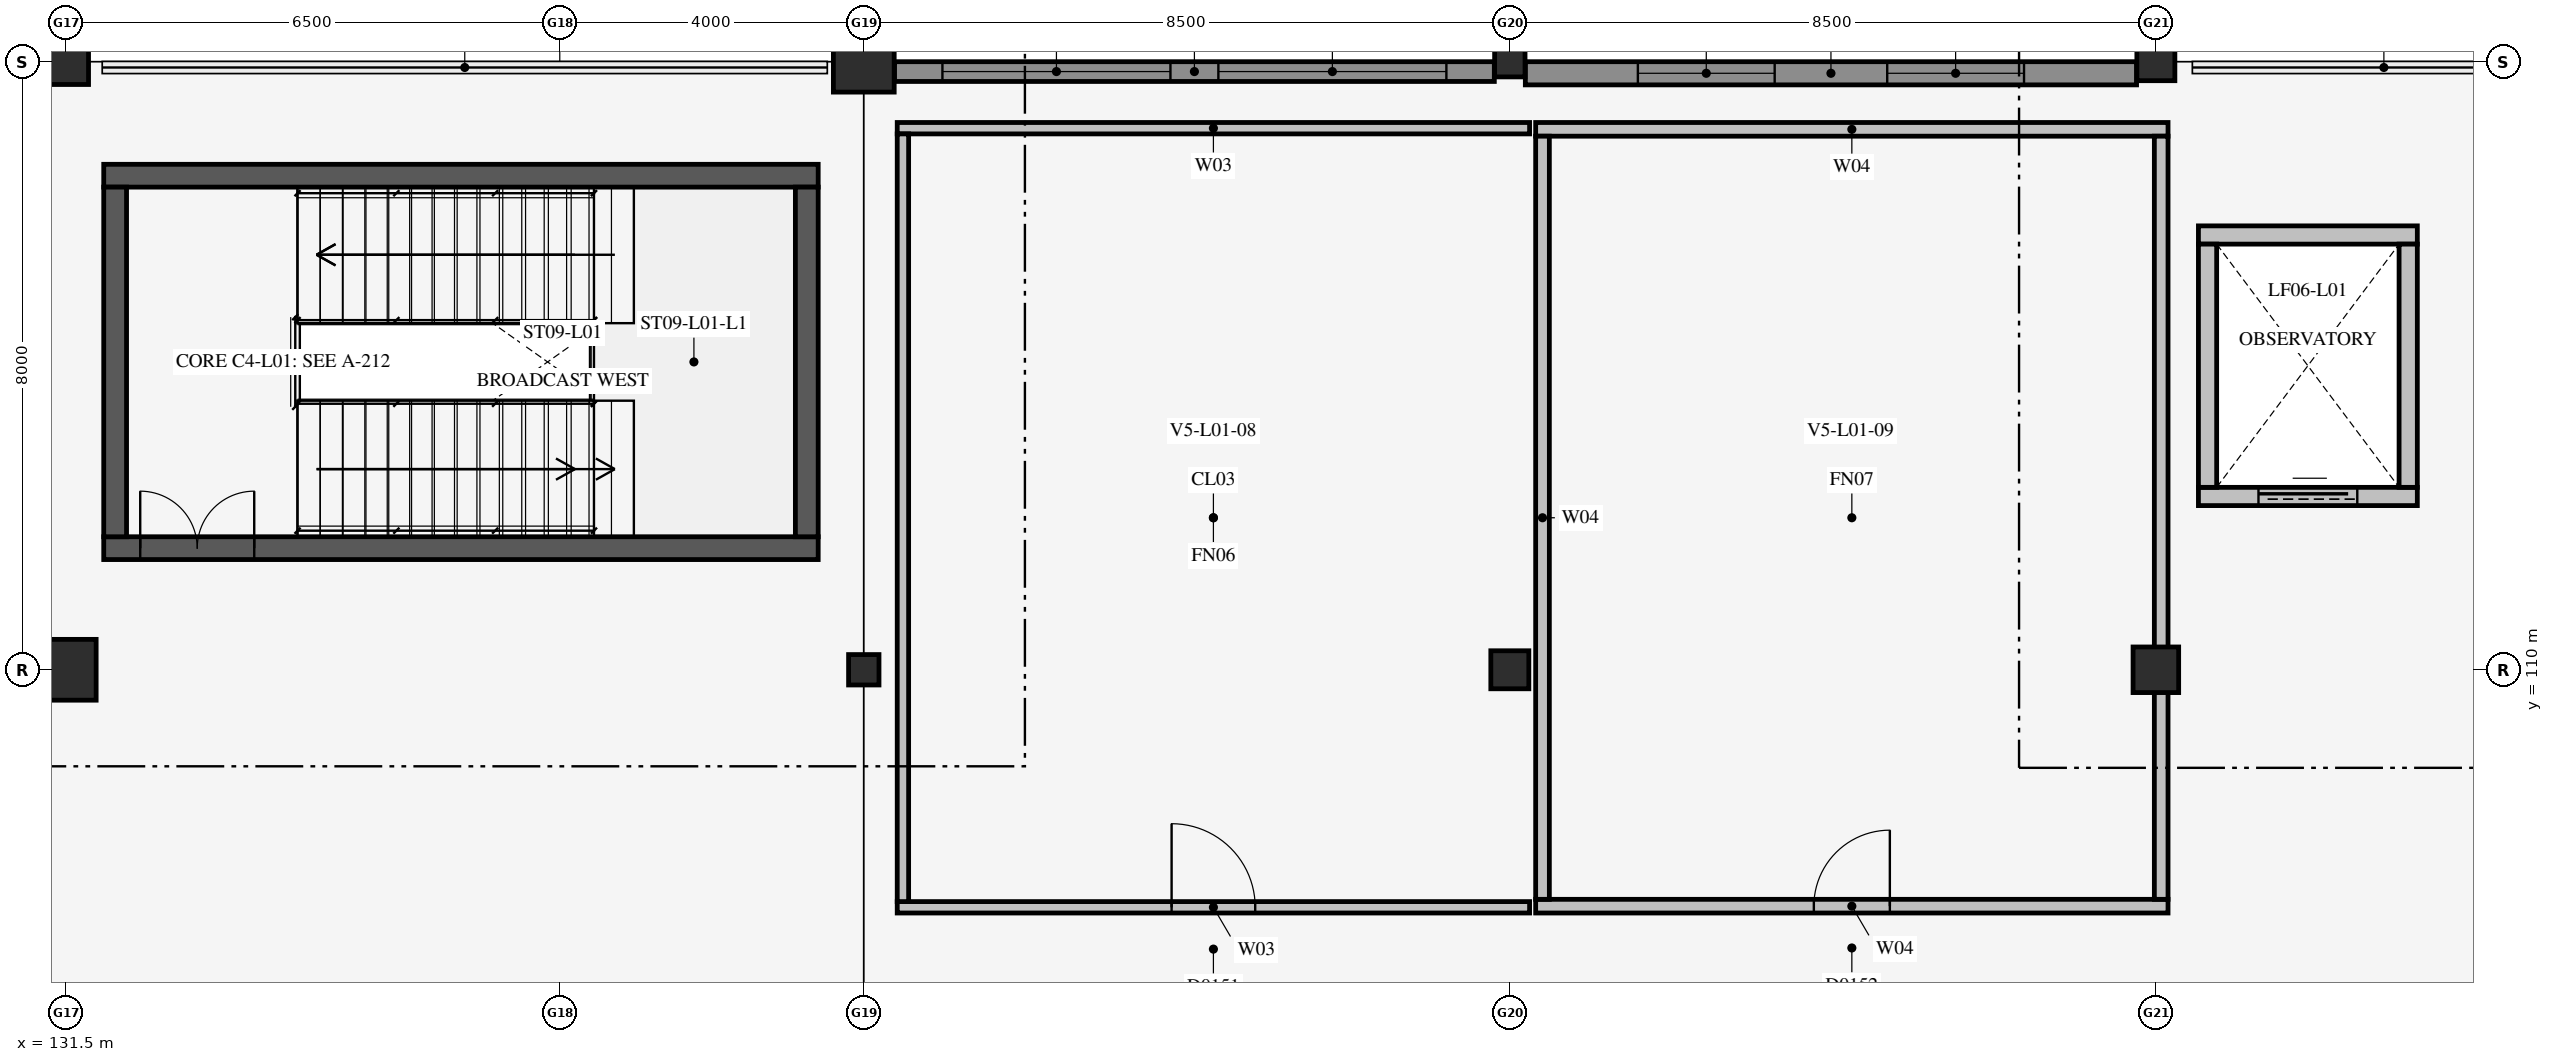
"""IFC4 building model, lengths in metres.
Left out: names, types, materials, properties, quantities, classifications, styles, units other than length and angle.
Written with IfcOpenShell. Run it as: python <this file> out.ifc"""

import sys

from ifc_helpers import new_model, si_unit, direction, frame, frame_2d, origin, origin_2d, place, context, subcontext, project, spatial, rectangle, circle, extrude, element, fill, save


model = new_model("IFC4")
c1 = context("Model", 3, precision=1e-05, world=origin(), true_north=direction((0.0, 1.0)))
c2 = subcontext(c1, "Body", "Model", "MODEL_VIEW")
j1 = project(units=[si_unit("LENGTHUNIT", "METRE"), si_unit("PLANEANGLEUNIT", "RADIAN")], contexts=[c1])
p1 = place(None, origin())
s1 = spatial("IfcSite", under=j1, at=p1, CompositionType="ELEMENT")
p2 = place(p1, origin())
s2 = spatial("IfcBuilding", under=s1, at=p2, CompositionType="ELEMENT")
p3 = place(p2, frame((0.0, 0.0, 5.4)))
s3 = spatial("IfcBuildingStorey", under=s2, at=p3, CompositionType="ELEMENT", Elevation=5.4)
p4 = place(p3, frame((132.0, 111.6, 0.0), z_axis=(0.0, 0.0, 1.0), x_axis=(1.0, 0.0, 0.0)))
e1 = element("IfcWall", 1, at=p4, inside=s3, PredefinedType="SHEAR", context=c2, shape_type="SweptSolid", body=[
    extrude(rectangle(XDim=9.4, YDim=0.3, at=frame_2d((4.7, 0.0))), origin(), (0.0, 0.0, 1.0), 4.56),
])
p5 = place(p4, frame((0.48, 0.0, 0.0)))
e2 = element("IfcOpeningElement", 2, at=p5, cuts=e1, PredefinedType="OPENING", context=c2, shape_type="SweptSolid", body=[
    extrude(rectangle(XDim=1.5, YDim=2.3, at=frame_2d((0.75, 1.15))), frame((0.0, 0.162, 0.0), z_axis=(0.0, -1.0, 0.0), x_axis=(1.0, 0.0, 0.0)), (0.0, 0.0, 1.0), 0.324),
])
p6 = place(p3, frame((132.0, 116.5, 0.0), z_axis=(0.0, 0.0, 1.0), x_axis=(1.0, 0.0, 0.0)))
e3 = element("IfcWall", 3, at=p6, inside=s3, PredefinedType="SHEAR", context=c2, shape_type="SweptSolid", body=[
    extrude(rectangle(XDim=9.4, YDim=0.3, at=frame_2d((4.7, 0.0))), origin(), (0.0, 0.0, 1.0), 4.56),
])
for number, where, z_axis, x_axis in (
    (4, (132.15, 111.75, 0.0), (0.0, 0.0, 1.0), (0.0, 1.0, 0.0)),
    (5, (141.25, 111.75, 0.0), (0.0, 0.0, 1.0), (0.0, 1.0, 0.0)),
):
    element("IfcWall", number, at=place(p3, frame(where, z_axis=z_axis, x_axis=x_axis)), inside=s3, PredefinedType="SHEAR", context=c2, shape_type="SweptSolid", body=[
        extrude(rectangle(XDim=4.6, YDim=0.3, at=frame_2d((2.3, 0.0))), origin(), (0.0, 0.0, 1.0), 4.56),
    ])
p7 = place(p3, frame((159.56, 112.28, 0.0), z_axis=(0.0, 0.0, 1.0), x_axis=(1.0, 0.0, 0.0)))
e6 = element("IfcWall", 6, at=p7, inside=s3, PredefinedType="SOLIDWALL", context=c2, shape_type="SweptSolid", body=[
    extrude(rectangle(XDim=2.88, YDim=0.24, at=frame_2d((1.44, 0.0))), origin(), (0.0, 0.0, 1.0), 4.8),
])
p8 = place(p7, frame((0.79, 0.0, 0.0)))
e7 = element("IfcOpeningElement", 7, at=p8, cuts=e6, PredefinedType="OPENING", context=c2, shape_type="SweptSolid", body=[
    extrude(rectangle(XDim=1.3, YDim=2.25, at=frame_2d((0.65, 1.125))), frame((0.0, 0.132, 0.0), z_axis=(0.0, -1.0, 0.0), x_axis=(1.0, 0.0, 0.0)), (0.0, 0.0, 1.0), 0.264),
])
p9 = place(p3, frame((159.56, 115.72, 0.0), z_axis=(0.0, 0.0, 1.0), x_axis=(1.0, 0.0, 0.0)))
e8 = element("IfcWall", 8, at=p9, inside=s3, PredefinedType="SOLIDWALL", context=c2, shape_type="SweptSolid", body=[
    extrude(rectangle(XDim=2.88, YDim=0.24, at=frame_2d((1.44, 0.0))), origin(), (0.0, 0.0, 1.0), 4.8),
])
for number, where, z_axis, x_axis in (
    (9, (159.68, 112.4, 0.0), (0.0, 0.0, 1.0), (0.0, 1.0, 0.0)),
    (10, (162.32, 112.4, 0.0), (0.0, 0.0, 1.0), (0.0, 1.0, 0.0)),
):
    element("IfcWall", number, at=place(p3, frame(where, z_axis=z_axis, x_axis=x_axis)), inside=s3, PredefinedType="SOLIDWALL", context=c2, shape_type="SweptSolid", body=[
        extrude(rectangle(XDim=3.2, YDim=0.24, at=frame_2d((1.6, 0.0))), origin(), (0.0, 0.0, 1.0), 4.8),
    ])
p10 = place(p3, frame((131.5, 110.0, 0.0), z_axis=(0.0, 0.0, 1.0), x_axis=(1.0, 0.0, 0.0)))
e11 = element("IfcColumn", 11, at=p10, inside=s3, PredefinedType="COLUMN", context=c2, shape_type="SweptSolid", body=[
    extrude(circle(Radius=0.4, at=origin_2d()), origin(), (0.0, 0.0, 1.0), 4.8),
])
p11 = place(p3, frame((131.5, 118.0, 0.0), z_axis=(0.0, 0.0, 1.0), x_axis=(1.0, 0.0, 0.0)))
e12 = element("IfcColumn", 12, at=p11, inside=s3, PredefinedType="COLUMN", context=c2, shape_type="SweptSolid", body=[
    extrude(circle(Radius=0.3, at=origin_2d()), origin(), (0.0, 0.0, 1.0), 4.8),
])
p12 = place(p3, frame((142.0, 110.0, 0.0), z_axis=(0.0, 0.0, 1.0), x_axis=(1.0, 0.0, 0.0)))
e13 = element("IfcColumn", 13, at=p12, inside=s3, PredefinedType="COLUMN", context=c2, shape_type="SweptSolid", body=[
    extrude(rectangle(XDim=0.4, YDim=0.4, at=origin_2d()), origin(), (0.0, 0.0, 1.0), 4.8),
])
p13 = place(p3, frame((142.0, 118.0, 0.0), z_axis=(0.0, 0.0, 1.0), x_axis=(1.0, 0.0, 0.0)))
e14 = element("IfcColumn", 14, at=p13, inside=s3, PredefinedType="COLUMN", context=c2, shape_type="SweptSolid", body=[
    extrude(circle(Radius=0.4, at=origin_2d()), origin(), (0.0, 0.0, 1.0), 4.8),
])
p14 = place(p3, frame((150.5, 110.0, 0.0), z_axis=(0.0, 0.0, 1.0), x_axis=(1.0, 0.0, 0.0)))
e15 = element("IfcColumn", 15, at=p14, inside=s3, PredefinedType="COLUMN", context=c2, shape_type="SweptSolid", body=[
    extrude(rectangle(XDim=0.5, YDim=0.5, at=origin_2d()), origin(), (0.0, 0.0, 1.0), 4.8),
])
p15 = place(p3, frame((150.5, 118.0, 0.0), z_axis=(0.0, 0.0, 1.0), x_axis=(1.0, 0.0, 0.0)))
e16 = element("IfcColumn", 16, at=p15, inside=s3, PredefinedType="COLUMN", context=c2, shape_type="SweptSolid", body=[
    extrude(rectangle(XDim=0.4, YDim=0.4, at=origin_2d()), origin(), (0.0, 0.0, 1.0), 4.8),
])
p16 = place(p3, frame((159.0, 110.0, 0.0), z_axis=(0.0, 0.0, 1.0), x_axis=(1.0, 0.0, 0.0)))
e17 = element("IfcColumn", 17, at=p16, inside=s3, PredefinedType="COLUMN", context=c2, shape_type="SweptSolid", body=[
    extrude(rectangle(XDim=0.6, YDim=0.6, at=origin_2d()), origin(), (0.0, 0.0, 1.0), 4.8),
])
p17 = place(p3, frame((159.0, 118.0, 0.0), z_axis=(0.0, 0.0, 1.0), x_axis=(1.0, 0.0, 0.0)))
e18 = element("IfcColumn", 18, at=p17, inside=s3, PredefinedType="COLUMN", context=c2, shape_type="SweptSolid", body=[
    extrude(rectangle(XDim=0.5, YDim=0.5, at=origin_2d()), origin(), (0.0, 0.0, 1.0), 4.8),
])
p18 = place(p3, frame((142.44, 106.875, 0.0), z_axis=(0.0, 0.0, 1.0), x_axis=(1.0, 0.0, 0.0)))
e19 = element("IfcWall", 19, at=p18, inside=s3, PredefinedType="PARTITIONING", context=c2, shape_type="SweptSolid", body=[
    extrude(rectangle(XDim=8.32, YDim=0.15, at=frame_2d((4.16, 0.0))), origin(), (0.0, 0.0, 1.0), 4.545),
])
p19 = place(p18, frame((3.61, 0.0, 0.0)))
e20 = element("IfcOpeningElement", 20, at=p19, cuts=e19, PredefinedType="OPENING", context=c2, shape_type="SweptSolid", body=[
    extrude(rectangle(XDim=1.1, YDim=2.25, at=frame_2d((0.55, 1.125))), frame((0.0, 0.087, 0.0), z_axis=(0.0, -1.0, 0.0), x_axis=(1.0, 0.0, 0.0)), (0.0, 0.0, 1.0), 0.174),
])
p20 = place(p3, frame((142.44, 117.125, 0.0), z_axis=(0.0, 0.0, 1.0), x_axis=(1.0, 0.0, 0.0)))
e21 = element("IfcWall", 21, at=p20, inside=s3, PredefinedType="PARTITIONING", context=c2, shape_type="SweptSolid", body=[
    extrude(rectangle(XDim=8.32, YDim=0.15, at=frame_2d((4.16, 0.0))), origin(), (0.0, 0.0, 1.0), 4.545),
])
p21 = place(p3, frame((142.515, 106.95, 0.0), z_axis=(0.0, 0.0, 1.0), x_axis=(0.0, 1.0, 0.0)))
e22 = element("IfcWall", 22, at=p21, inside=s3, PredefinedType="PARTITIONING", context=c2, shape_type="SweptSolid", body=[
    extrude(rectangle(XDim=10.1, YDim=0.15, at=frame_2d((5.05, 0.0))), origin(), (0.0, 0.0, 1.0), 4.545),
])
p22 = place(p3, frame((150.84, 106.89, 0.0), z_axis=(0.0, 0.0, 1.0), x_axis=(1.0, 0.0, 0.0)))
e23 = element("IfcWall", 23, at=p22, inside=s3, PredefinedType="PARTITIONING", context=c2, shape_type="SweptSolid", body=[
    extrude(rectangle(XDim=8.32, YDim=0.18, at=frame_2d((4.16, 0.0))), origin(), (0.0, 0.0, 1.0), 4.545),
])
p23 = place(p22, frame((3.66, 0.0, 0.0)))
e24 = element("IfcOpeningElement", 24, at=p23, cuts=e23, PredefinedType="OPENING", context=c2, shape_type="SweptSolid", body=[
    extrude(rectangle(XDim=1.0, YDim=2.2, at=frame_2d((0.5, 1.1))), frame((0.0, 0.102, 0.0), z_axis=(0.0, -1.0, 0.0), x_axis=(1.0, 0.0, 0.0)), (0.0, 0.0, 1.0), 0.204),
])
p24 = place(p3, frame((150.84, 117.11, 0.0), z_axis=(0.0, 0.0, 1.0), x_axis=(1.0, 0.0, 0.0)))
e25 = element("IfcWall", 25, at=p24, inside=s3, PredefinedType="PARTITIONING", context=c2, shape_type="SweptSolid", body=[
    extrude(rectangle(XDim=8.32, YDim=0.18, at=frame_2d((4.16, 0.0))), origin(), (0.0, 0.0, 1.0), 4.545),
])
p25 = place(p3, frame((159.07, 106.98, 0.0), z_axis=(0.0, 0.0, 1.0), x_axis=(0.0, 1.0, 0.0)))
e26 = element("IfcWall", 26, at=p25, inside=s3, PredefinedType="PARTITIONING", context=c2, shape_type="SweptSolid", body=[
    extrude(rectangle(XDim=10.04, YDim=0.18, at=frame_2d((5.02, 0.0))), origin(), (0.0, 0.0, 1.0), 3.598),
])
p26 = place(p3, frame((150.93, 106.98, 0.0), z_axis=(0.0, 0.0, 1.0), x_axis=(0.0, 1.0, 0.0)))
e27 = element("IfcWall", 27, at=p26, inside=s3, PredefinedType="PARTITIONING", context=c2, shape_type="SweptSolid", body=[
    extrude(rectangle(XDim=10.04, YDim=0.18, at=frame_2d((5.02, 0.0))), origin(), (0.0, 0.0, 1.0), 4.545),
])
p27 = place(p3, frame((142.404, 117.87, 0.0), z_axis=(0.0, 0.0, 1.0), x_axis=(1.0, 0.0, 0.0)))
e28 = element("IfcWall", 28, at=p27, inside=s3, PredefinedType="SOLIDWALL", context=c2, shape_type="SweptSolid", body=[
    extrude(rectangle(XDim=7.892, YDim=0.26, at=frame_2d((3.946, 0.0))), origin(), (0.0, 0.0, 1.0), 3.994),
])
p28 = place(p27, frame((0.631, 0.0, 0.95)))
e29 = element("IfcOpeningElement", 29, at=p28, cuts=e28, PredefinedType="OPENING", context=c2, shape_type="SweptSolid", body=[
    extrude(rectangle(XDim=3.0, YDim=1.5, at=frame_2d((1.5, 0.75))), frame((0.0, 0.142, 0.0), z_axis=(0.0, -1.0, 0.0), x_axis=(1.0, 0.0, 0.0)), (0.0, 0.0, 1.0), 0.284),
])
p29 = place(p27, frame((4.261, 0.0, 0.95)))
e30 = element("IfcOpeningElement", 30, at=p29, cuts=e28, PredefinedType="OPENING", context=c2, shape_type="SweptSolid", body=[
    extrude(rectangle(XDim=3.0, YDim=1.5, at=frame_2d((1.5, 0.75))), frame((0.0, 0.142, 0.0), z_axis=(0.0, -1.0, 0.0), x_axis=(1.0, 0.0, 0.0)), (0.0, 0.0, 1.0), 0.284),
])
p30 = place(p3, frame((150.704, 117.847, 0.0), z_axis=(0.0, 0.0, 1.0), x_axis=(1.0, 0.0, 0.0)))
e31 = element("IfcWall", 31, at=p30, inside=s3, PredefinedType="SOLIDWALL", context=c2, shape_type="SweptSolid", body=[
    extrude(rectangle(XDim=8.042, YDim=0.305, at=frame_2d((4.021, 0.0))), origin(), (0.0, 0.0, 1.0), 3.918),
])
p31 = place(p30, frame((1.481, 0.0, 0.95)))
e32 = element("IfcOpeningElement", 32, at=p31, cuts=e31, PredefinedType="OPENING", context=c2, shape_type="SweptSolid", body=[
    extrude(rectangle(XDim=1.8, YDim=1.8, at=frame_2d((0.9, 0.9))), frame((0.0, 0.165, 0.0), z_axis=(0.0, -1.0, 0.0), x_axis=(1.0, 0.0, 0.0)), (0.0, 0.0, 1.0), 0.329),
])
p32 = place(p30, frame((4.761, 0.0, 0.95)))
e33 = element("IfcOpeningElement", 33, at=p32, cuts=e31, PredefinedType="OPENING", context=c2, shape_type="SweptSolid", body=[
    extrude(rectangle(XDim=1.8, YDim=1.8, at=frame_2d((0.9, 0.9))), frame((0.0, 0.165, 0.0), z_axis=(0.0, -1.0, 0.0), x_axis=(1.0, 0.0, 0.0)), (0.0, 0.0, 1.0), 0.329),
])
p33 = place(p5, origin())
e34 = element("IfcDoor", 34, at=p33, inside=s3, OperationType="DOUBLE_DOOR_SINGLE_SWING", PredefinedType="DOOR", context=c2, shape_type="SweptSolid", body=[
    extrude(rectangle(XDim=1.5, YDim=2.3, at=frame_2d((0.75, 1.15))), frame((0.0, 0.025, 0.0), z_axis=(0.0, -1.0, 0.0), x_axis=(1.0, 0.0, 0.0)), (0.0, 0.0, 1.0), 0.05),
])
fill(e2, e34)
p34 = place(p19, origin())
e35 = element("IfcDoor", 35, at=p34, inside=s3, OperationType="SINGLE_SWING_LEFT", PredefinedType="DOOR", context=c2, shape_type="SweptSolid", body=[
    extrude(rectangle(XDim=1.1, YDim=2.25, at=frame_2d((0.55, 1.125))), frame((0.0, 0.025, 0.0), z_axis=(0.0, -1.0, 0.0), x_axis=(1.0, 0.0, 0.0)), (0.0, 0.0, 1.0), 0.05),
])
fill(e20, e35)
p35 = place(p23, origin())
e36 = element("IfcDoor", 36, at=p35, inside=s3, OperationType="SINGLE_SWING_RIGHT", PredefinedType="DOOR", context=c2, shape_type="SweptSolid", body=[
    extrude(rectangle(XDim=1.0, YDim=2.2, at=frame_2d((0.5, 1.1))), frame((0.0, 0.025, 0.0), z_axis=(0.0, -1.0, 0.0), x_axis=(1.0, 0.0, 0.0)), (0.0, 0.0, 1.0), 0.05),
])
fill(e24, e36)
p36 = place(p28, origin())
e37 = element("IfcWindow", 37, at=p36, inside=s3, PartitioningType="SINGLE_PANEL", PredefinedType="WINDOW", context=c2, shape_type="SweptSolid", body=[
    extrude(rectangle(XDim=3.0, YDim=1.5, at=frame_2d((1.5, 0.75))), frame((0.0, 0.03, 0.0), z_axis=(0.0, -1.0, 0.0), x_axis=(1.0, 0.0, 0.0)), (0.0, 0.0, 1.0), 0.06),
])
fill(e29, e37)
p37 = place(p29, origin())
e38 = element("IfcWindow", 38, at=p37, inside=s3, PartitioningType="SINGLE_PANEL", PredefinedType="WINDOW", context=c2, shape_type="SweptSolid", body=[
    extrude(rectangle(XDim=3.0, YDim=1.5, at=frame_2d((1.5, 0.75))), frame((0.0, 0.03, 0.0), z_axis=(0.0, -1.0, 0.0), x_axis=(1.0, 0.0, 0.0)), (0.0, 0.0, 1.0), 0.06),
])
fill(e30, e38)
p38 = place(p31, origin())
e39 = element("IfcWindow", 39, at=p38, inside=s3, PartitioningType="SINGLE_PANEL", PredefinedType="WINDOW", context=c2, shape_type="SweptSolid", body=[
    extrude(rectangle(XDim=1.8, YDim=1.8, at=frame_2d((0.9, 0.9))), frame((0.0, 0.03, 0.0), z_axis=(0.0, -1.0, 0.0), x_axis=(1.0, 0.0, 0.0)), (0.0, 0.0, 1.0), 0.06),
])
fill(e32, e39)
p39 = place(p32, origin())
e40 = element("IfcWindow", 40, at=p39, inside=s3, PartitioningType="SINGLE_PANEL", PredefinedType="WINDOW", context=c2, shape_type="SweptSolid", body=[
    extrude(rectangle(XDim=1.8, YDim=1.8, at=frame_2d((0.9, 0.9))), frame((0.0, 0.03, 0.0), z_axis=(0.0, -1.0, 0.0), x_axis=(1.0, 0.0, 0.0)), (0.0, 0.0, 1.0), 0.06),
])
fill(e33, e40)
p40 = place(p8, origin())
e41 = element("IfcDoor", 41, at=p40, inside=s3, OperationType="SLIDING_TO_RIGHT", PredefinedType="USERDEFINED", context=c2, shape_type="SweptSolid", body=[
    extrude(rectangle(XDim=1.3, YDim=2.25, at=frame_2d((0.65, 1.125))), frame((0.0, 0.025, 0.0), z_axis=(0.0, -1.0, 0.0), x_axis=(1.0, 0.0, 0.0)), (0.0, 0.0, 1.0), 0.05),
])
fill(e7, e41)
save(model, sys.argv[1])
